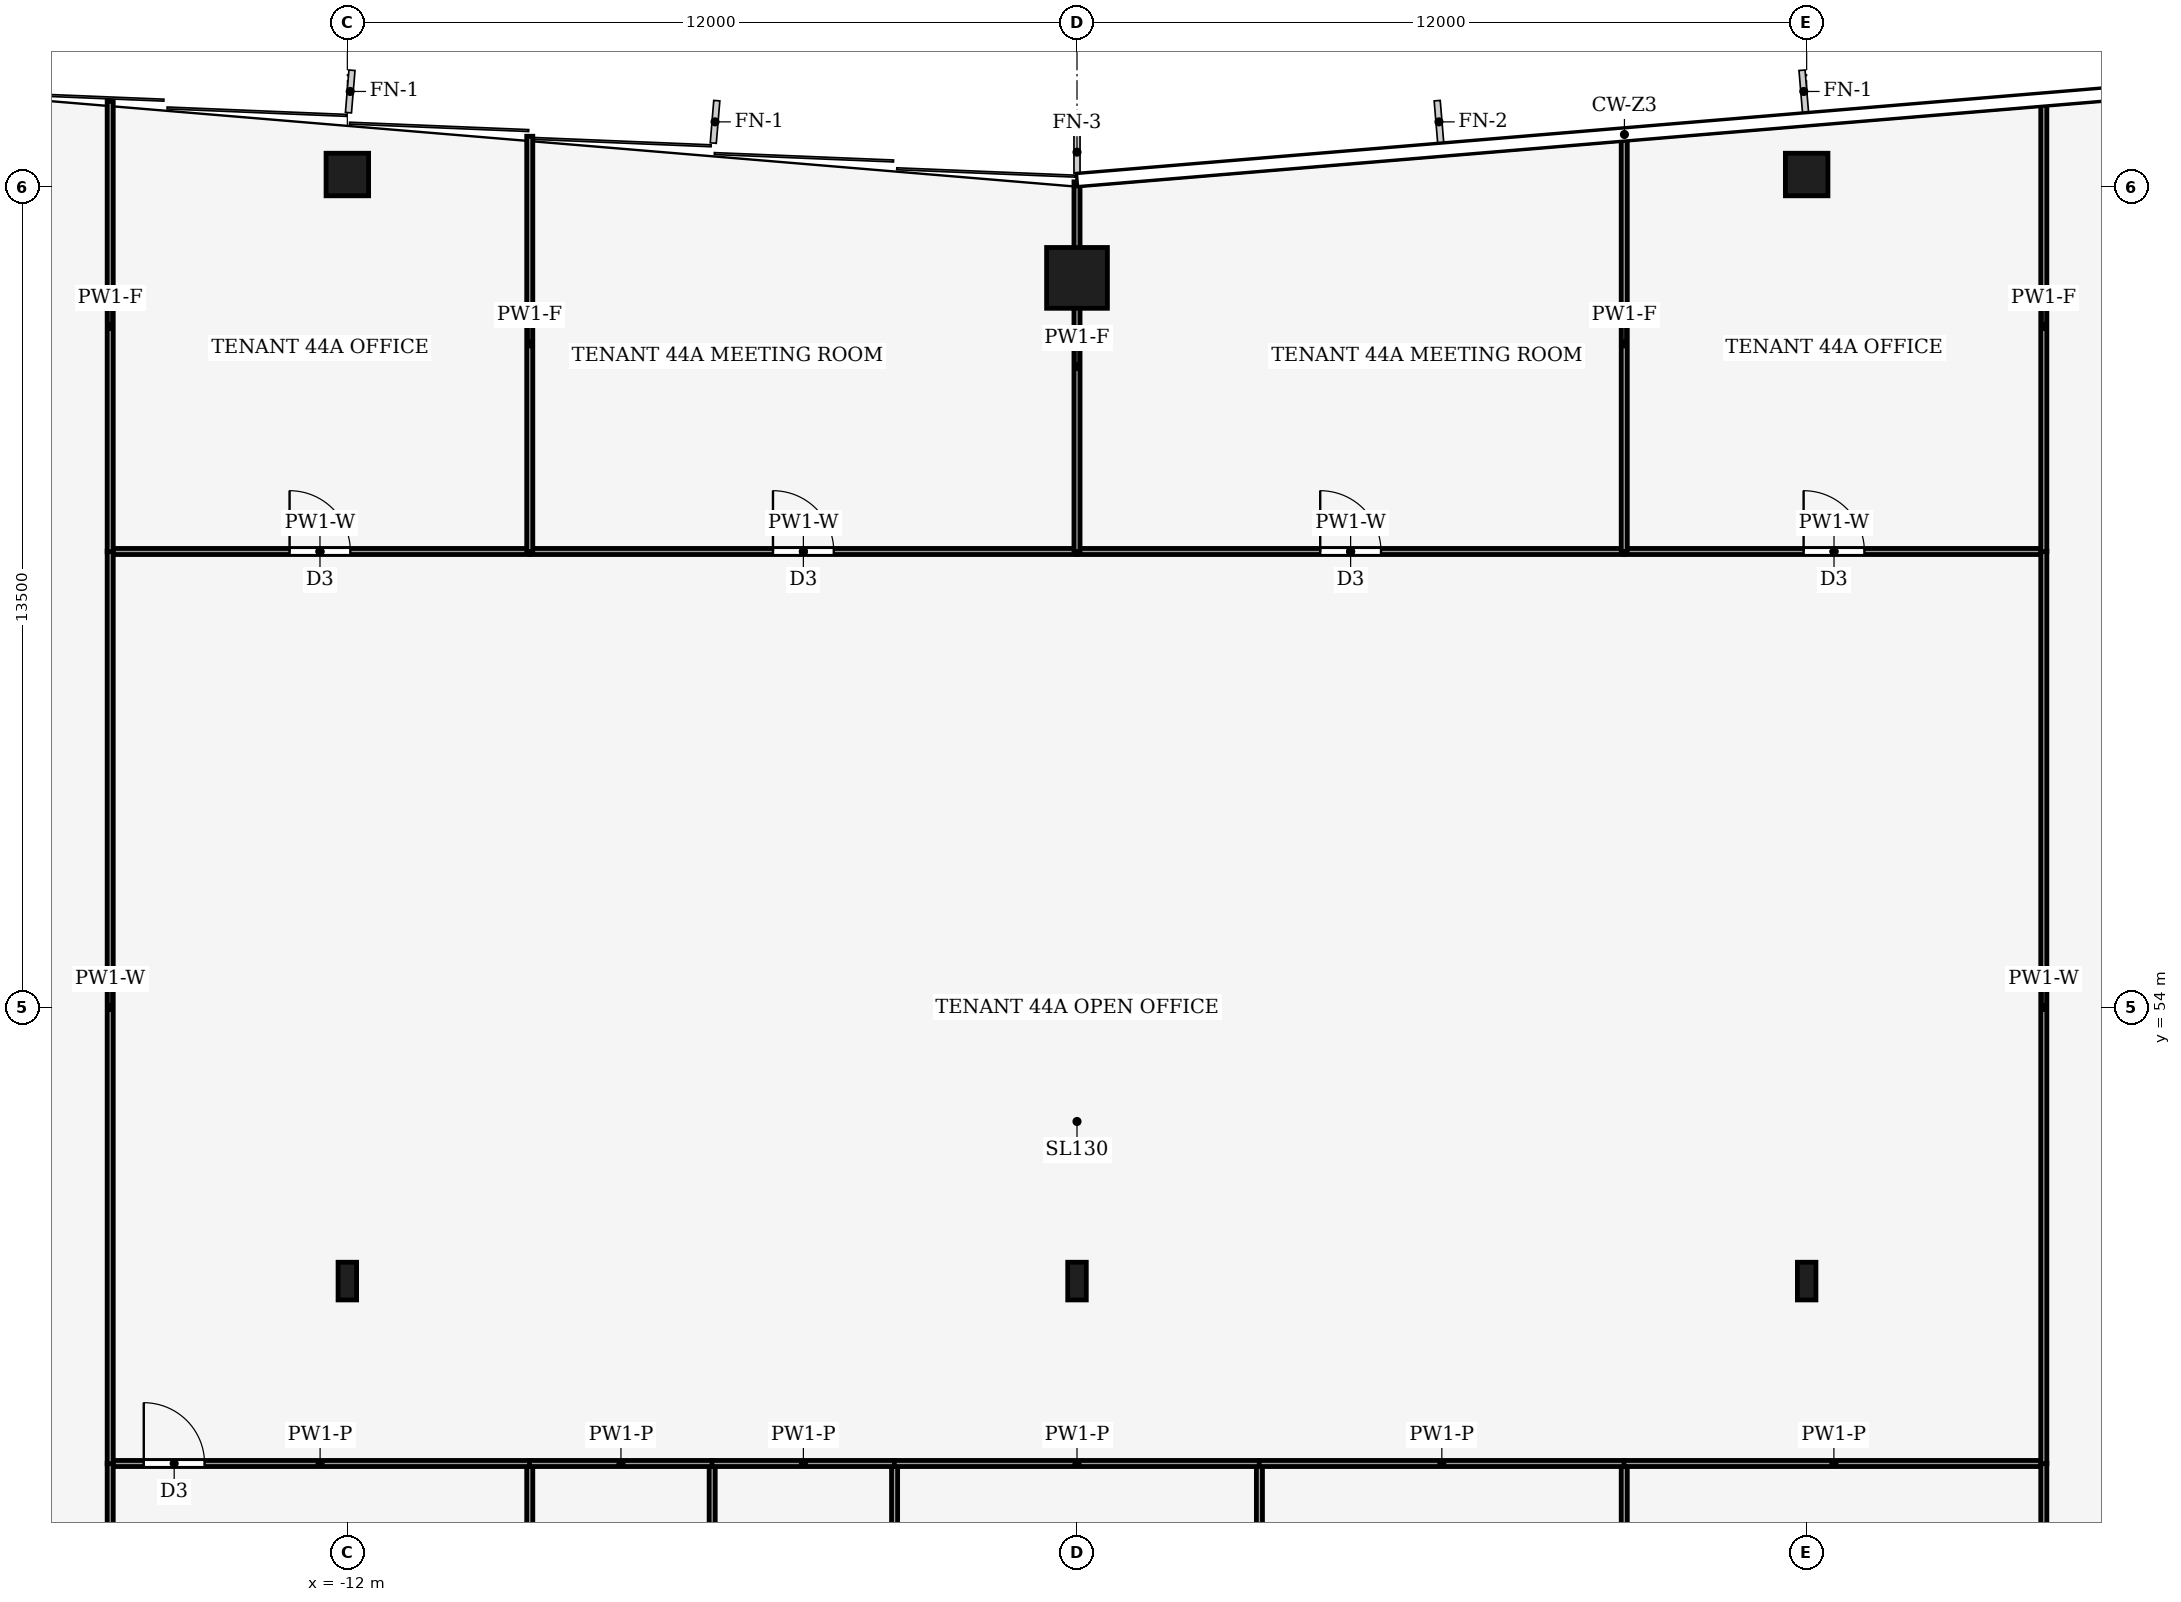
"""IFC4 building model, lengths in metres.
Left out: names, types, materials, properties, quantities, classifications, styles, units other than length and angle.
Written with IfcOpenShell. Run it as: python <this file> out.ifc"""

import sys

from ifc_helpers import new_model, si_unit, direction, frame, frame_2d, origin, origin_2d, place, context, subcontext, project, spatial, rectangle, hollow_rectangle, i_section, extrude, element, fill, save


model = new_model("IFC4")
c1 = context("Model", 3, precision=1e-05, world=origin(), true_north=direction((0.0, 1.0)))
c2 = subcontext(c1, "Body", "Model", "MODEL_VIEW")
j1 = project(units=[si_unit("LENGTHUNIT", "METRE"), si_unit("PLANEANGLEUNIT", "RADIAN")], contexts=[c1])
p1 = place(None, origin())
s1 = spatial("IfcSite", under=j1, at=p1, CompositionType="ELEMENT")
p2 = place(p1, origin())
s2 = spatial("IfcBuilding", under=s1, at=p2, CompositionType="ELEMENT")
p3 = place(p2, frame((0.0, 0.0, 194.0)))
s3 = spatial("IfcBuildingStorey", under=s2, at=p3, CompositionType="ELEMENT", Elevation=194.0)
p4 = place(p3, frame((0.0, 66.0, 0.0), z_axis=(0.0, 0.0, 1.0), x_axis=(1.0, 0.0, 0.0)))
e1 = element("IfcColumn", 1, at=p4, inside=s3, PredefinedType="COLUMN", context=c2, shape_type="SweptSolid", body=[
    extrude(hollow_rectangle(XDim=1.0, YDim=1.0, WallThickness=0.06, at=origin_2d()), origin(), (0.0, 0.0, 1.0), 4.0),
])
for number, where, z_axis, x_axis in (
    (2, (-12.0, 67.7, 0.0), (0.0, 0.0, 1.0), (1.0, 0.0, 0.0)),
    (3, (12.0, 67.7, 0.0), (0.0, 0.0, 1.0), (1.0, 0.0, 0.0)),
):
    element("IfcColumn", number, at=place(p3, frame(where, z_axis=z_axis, x_axis=x_axis)), inside=s3, PredefinedType="COLUMN", context=c2, shape_type="SweptSolid", body=[
        extrude(hollow_rectangle(XDim=0.7, YDim=0.7, WallThickness=0.03, at=origin_2d()), origin(), (0.0, 0.0, 1.0), 4.0),
    ])
for number, where, z_axis, x_axis in (
    (4, (-12.0, 49.5, 0.0), (0.0, 0.0, 1.0), (1.0, 0.0, 0.0)),
    (5, (0.0, 49.5, 0.0), (0.0, 0.0, 1.0), (1.0, 0.0, 0.0)),
    (6, (12.0, 49.5, 0.0), (0.0, 0.0, 1.0), (1.0, 0.0, 0.0)),
):
    element("IfcColumn", number, at=place(p3, frame(where, z_axis=z_axis, x_axis=x_axis)), inside=s3, PredefinedType="COLUMN", context=c2, shape_type="SweptSolid", body=[
        extrude(i_section(OverallWidth=0.305, OverallDepth=0.62, WebThickness=0.021, FlangeThickness=0.04, FilletRadius=0.027, at=origin_2d()), origin(), (0.0, 0.0, 1.0), 4.0),
    ])
p5 = place(p3, frame((-9.0, 46.5, 0.0), z_axis=(0.0, 0.0, 1.0), x_axis=(0.0, -1.0, 0.0)))
e7 = element("IfcWall", 7, at=p5, inside=s3, PredefinedType="PARTITIONING", context=c2, shape_type="SweptSolid", body=[
    extrude(rectangle(XDim=5.6, YDim=0.1, at=frame_2d((2.8, 0.0))), origin(), (0.0, 0.0, 1.0), 3.87),
])
p6 = place(p5, frame((2.3, 0.0, 0.0)))
e8 = element("IfcOpeningElement", 8, at=p6, cuts=e7, PredefinedType="OPENING", context=c2, shape_type="SweptSolid", body=[
    extrude(rectangle(XDim=1.0, YDim=2.1, at=frame_2d((0.5, 1.05))), frame((0.0, 0.06, 0.0), z_axis=(0.0, -1.0, 0.0), x_axis=(1.0, 0.0, 0.0)), (0.0, 0.0, 1.0), 0.12),
])
p7 = place(p3, frame((-15.9, 46.5, 0.0), z_axis=(0.0, 0.0, 1.0), x_axis=(1.0, 0.0, 0.0)))
e9 = element("IfcWall", 9, at=p7, inside=s3, PredefinedType="PARTITIONING", context=c2, shape_type="SweptSolid", body=[
    extrude(rectangle(XDim=6.904, YDim=0.1, at=frame_2d((3.452, 0.0))), origin(), (0.0, 0.0, 1.0), 3.44),
])
p8 = place(p7, frame((0.552, 0.0, 0.0)))
e10 = element("IfcOpeningElement", 10, at=p8, cuts=e9, PredefinedType="OPENING", context=c2, shape_type="SweptSolid", body=[
    extrude(rectangle(XDim=1.0, YDim=2.1, at=frame_2d((0.5, 1.05))), frame((0.0, 0.06, 0.0), z_axis=(0.0, -1.0, 0.0), x_axis=(1.0, 0.0, 0.0)), (0.0, 0.0, 1.0), 0.12),
])
p9 = place(p3, frame((-15.9, 46.504, 0.0), z_axis=(0.0, 0.0, 1.0), x_axis=(0.0, -1.0, 0.0)))
e11 = element("IfcWall", 11, at=p9, inside=s3, PredefinedType="PARTITIONING", context=c2, shape_type="SweptSolid", body=[
    extrude(rectangle(XDim=5.608, YDim=0.1, at=frame_2d((2.804, 0.0))), origin(), (0.0, 0.0, 1.0), 3.44),
])
p10 = place(p3, frame((-6.0, 46.5, 0.0), z_axis=(0.0, 0.0, 1.0), x_axis=(0.0, -1.0, 0.0)))
e12 = element("IfcWall", 12, at=p10, inside=s3, PredefinedType="PARTITIONING", context=c2, shape_type="SweptSolid", body=[
    extrude(rectangle(XDim=5.6, YDim=0.1, at=frame_2d((2.8, 0.0))), origin(), (0.0, 0.0, 1.0), 3.87),
])
p11 = place(p10, frame((2.3, 0.0, 0.0)))
e13 = element("IfcOpeningElement", 13, at=p11, cuts=e12, PredefinedType="OPENING", context=c2, shape_type="SweptSolid", body=[
    extrude(rectangle(XDim=1.0, YDim=2.1, at=frame_2d((0.5, 1.05))), frame((0.0, 0.06, 0.0), z_axis=(0.0, -1.0, 0.0), x_axis=(1.0, 0.0, 0.0)), (0.0, 0.0, 1.0), 0.12),
])
p12 = place(p3, frame((-5.996, 46.5, 0.0), z_axis=(0.0, 0.0, 1.0), x_axis=(-1.0, 0.0, 0.0)))
e14 = element("IfcWall", 14, at=p12, inside=s3, PredefinedType="PARTITIONING", context=c2, shape_type="SweptSolid", body=[
    extrude(rectangle(XDim=3.008, YDim=0.1, at=frame_2d((1.504, 0.0))), origin(), (0.0, 0.0, 1.0), 3.44),
])
p13 = place(p3, frame((-3.0, 40.9, 0.0), z_axis=(0.0, 0.0, 1.0), x_axis=(0.0, 1.0, 0.0)))
e15 = element("IfcWall", 15, at=p13, inside=s3, PredefinedType="PARTITIONING", context=c2, shape_type="SweptSolid", body=[
    extrude(rectangle(XDim=5.6, YDim=0.1, at=frame_2d((2.8, 0.0))), origin(), (0.0, 0.0, 1.0), 3.87),
])
p14 = place(p3, frame((-2.996, 46.5, 0.0), z_axis=(0.0, 0.0, 1.0), x_axis=(-1.0, 0.0, 0.0)))
e16 = element("IfcWall", 16, at=p14, inside=s3, PredefinedType="PARTITIONING", context=c2, shape_type="SweptSolid", body=[
    extrude(rectangle(XDim=3.008, YDim=0.1, at=frame_2d((1.504, 0.0))), origin(), (0.0, 0.0, 1.0), 3.44),
])
p15 = place(p3, frame((3.0, 40.9, 0.0), z_axis=(0.0, 0.0, 1.0), x_axis=(0.0, 1.0, 0.0)))
e17 = element("IfcWall", 17, at=p15, inside=s3, PredefinedType="PARTITIONING", context=c2, shape_type="SweptSolid", body=[
    extrude(rectangle(XDim=5.6, YDim=0.1, at=frame_2d((2.8, 0.0))), origin(), (0.0, 0.0, 1.0), 3.87),
])
p16 = place(p3, frame((3.004, 46.5, 0.0), z_axis=(0.0, 0.0, 1.0), x_axis=(-1.0, 0.0, 0.0)))
e18 = element("IfcWall", 18, at=p16, inside=s3, PredefinedType="PARTITIONING", context=c2, shape_type="SweptSolid", body=[
    extrude(rectangle(XDim=6.008, YDim=0.1, at=frame_2d((3.004, 0.0))), origin(), (0.0, 0.0, 1.0), 3.44),
])
p17 = place(p3, frame((9.0, 40.9, 0.0), z_axis=(0.0, 0.0, 1.0), x_axis=(0.0, 1.0, 0.0)))
e19 = element("IfcWall", 19, at=p17, inside=s3, PredefinedType="PARTITIONING", context=c2, shape_type="SweptSolid", body=[
    extrude(rectangle(XDim=5.6, YDim=0.1, at=frame_2d((2.8, 0.0))), origin(), (0.0, 0.0, 1.0), 3.87),
])
p18 = place(p3, frame((9.004, 46.5, 0.0), z_axis=(0.0, 0.0, 1.0), x_axis=(-1.0, 0.0, 0.0)))
e20 = element("IfcWall", 20, at=p18, inside=s3, PredefinedType="PARTITIONING", context=c2, shape_type="SweptSolid", body=[
    extrude(rectangle(XDim=6.008, YDim=0.1, at=frame_2d((3.004, 0.0))), origin(), (0.0, 0.0, 1.0), 3.44),
])
p19 = place(p3, frame((15.9, 46.5, 0.0), z_axis=(0.0, 0.0, 1.0), x_axis=(-1.0, 0.0, 0.0)))
e21 = element("IfcWall", 21, at=p19, inside=s3, PredefinedType="PARTITIONING", context=c2, shape_type="SweptSolid", body=[
    extrude(rectangle(XDim=6.904, YDim=0.1, at=frame_2d((3.452, 0.0))), origin(), (0.0, 0.0, 1.0), 3.44),
])
p20 = place(p3, frame((15.9, 40.896, 0.0), z_axis=(0.0, 0.0, 1.0), x_axis=(0.0, 1.0, 0.0)))
e22 = element("IfcWall", 22, at=p20, inside=s3, PredefinedType="PARTITIONING", context=c2, shape_type="SweptSolid", body=[
    extrude(rectangle(XDim=5.608, YDim=0.1, at=frame_2d((2.804, 0.0))), origin(), (0.0, 0.0, 1.0), 3.44),
])
p21 = place(p3, frame((-15.9, 61.5, 0.0), z_axis=(0.0, 0.0, 1.0), x_axis=(1.0, 0.0, 0.0)))
e23 = element("IfcWall", 23, at=p21, inside=s3, PredefinedType="PARTITIONING", context=c2, shape_type="SweptSolid", body=[
    extrude(rectangle(XDim=6.9, YDim=0.1, at=frame_2d((3.45, 0.0))), origin(), (0.0, 0.0, 1.0), 3.24),
])
p22 = place(p21, frame((2.95, 0.0, 0.0)))
e24 = element("IfcOpeningElement", 24, at=p22, cuts=e23, PredefinedType="OPENING", context=c2, shape_type="SweptSolid", body=[
    extrude(rectangle(XDim=1.0, YDim=2.1, at=frame_2d((0.5, 1.05))), frame((0.0, 0.06, 0.0), z_axis=(0.0, -1.0, 0.0), x_axis=(1.0, 0.0, 0.0)), (0.0, 0.0, 1.0), 0.12),
])
p23 = place(p3, frame((-9.0, 61.5, 0.0), z_axis=(0.0, 0.0, 1.0), x_axis=(1.0, 0.0, 0.0)))
e25 = element("IfcWall", 25, at=p23, inside=s3, PredefinedType="PARTITIONING", context=c2, shape_type="SweptSolid", body=[
    extrude(rectangle(XDim=9.0, YDim=0.1, at=frame_2d((4.5, 0.0))), origin(), (0.0, 0.0, 1.0), 3.24),
])
p24 = place(p23, frame((4.0, 0.0, 0.0)))
e26 = element("IfcOpeningElement", 26, at=p24, cuts=e25, PredefinedType="OPENING", context=c2, shape_type="SweptSolid", body=[
    extrude(rectangle(XDim=1.0, YDim=2.1, at=frame_2d((0.5, 1.05))), frame((0.0, 0.06, 0.0), z_axis=(0.0, -1.0, 0.0), x_axis=(1.0, 0.0, 0.0)), (0.0, 0.0, 1.0), 0.12),
])
p25 = place(p3, frame((0.0, 61.5, 0.0), z_axis=(0.0, 0.0, 1.0), x_axis=(1.0, 0.0, 0.0)))
e27 = element("IfcWall", 27, at=p25, inside=s3, PredefinedType="PARTITIONING", context=c2, shape_type="SweptSolid", body=[
    extrude(rectangle(XDim=9.0, YDim=0.1, at=frame_2d((4.5, 0.0))), origin(), (0.0, 0.0, 1.0), 3.24),
])
p26 = place(p25, frame((4.0, 0.0, 0.0)))
e28 = element("IfcOpeningElement", 28, at=p26, cuts=e27, PredefinedType="OPENING", context=c2, shape_type="SweptSolid", body=[
    extrude(rectangle(XDim=1.0, YDim=2.1, at=frame_2d((0.5, 1.05))), frame((0.0, 0.06, 0.0), z_axis=(0.0, -1.0, 0.0), x_axis=(1.0, 0.0, 0.0)), (0.0, 0.0, 1.0), 0.12),
])
p27 = place(p3, frame((9.0, 61.5, 0.0), z_axis=(0.0, 0.0, 1.0), x_axis=(1.0, 0.0, 0.0)))
e29 = element("IfcWall", 29, at=p27, inside=s3, PredefinedType="PARTITIONING", context=c2, shape_type="SweptSolid", body=[
    extrude(rectangle(XDim=6.9, YDim=0.1, at=frame_2d((3.45, 0.0))), origin(), (0.0, 0.0, 1.0), 3.24),
])
p28 = place(p27, frame((2.95, 0.0, 0.0)))
e30 = element("IfcOpeningElement", 30, at=p28, cuts=e29, PredefinedType="OPENING", context=c2, shape_type="SweptSolid", body=[
    extrude(rectangle(XDim=1.0, YDim=2.1, at=frame_2d((0.5, 1.05))), frame((0.0, 0.06, 0.0), z_axis=(0.0, -1.0, 0.0), x_axis=(1.0, 0.0, 0.0)), (0.0, 0.0, 1.0), 0.12),
])
for number, where, z_axis, x_axis in (
    (31, (-15.9, 61.504, 0.0), (0.0, 0.0, 1.0), (0.0, -1.0, 0.0)),
    (32, (15.9, 46.496, 0.0), (0.0, 0.0, 1.0), (0.0, 1.0, 0.0)),
):
    element("IfcWall", number, at=place(p3, frame(where, z_axis=z_axis, x_axis=x_axis)), inside=s3, PredefinedType="PARTITIONING", context=c2, shape_type="SweptSolid", body=[
        extrude(rectangle(XDim=15.008, YDim=0.1, at=frame_2d((7.504, 0.0))), origin(), (0.0, 0.0, 1.0), 3.24),
    ])
p29 = place(p3, frame((-9.0, 61.5, 0.0), z_axis=(0.0, 0.0, 1.0), x_axis=(0.0, 1.0, 0.0)))
e33 = element("IfcWall", 33, at=p29, inside=s3, PredefinedType="PARTITIONING", context=c2, shape_type="SweptSolid", body=[
    extrude(rectangle(XDim=6.83, YDim=0.1, at=frame_2d((3.415, 0.0))), origin(), (0.0, 0.0, 1.0), 3.04),
])
p30 = place(p3, frame((-15.9, 68.905, 0.0), z_axis=(0.0, 0.0, 1.0), x_axis=(0.0, -1.0, 0.0)))
e34 = element("IfcWall", 34, at=p30, inside=s3, PredefinedType="PARTITIONING", context=c2, shape_type="SweptSolid", body=[
    extrude(rectangle(XDim=7.409, YDim=0.1, at=frame_2d((3.705, 0.0))), origin(), (0.0, 0.0, 1.0), 3.04),
])
p31 = place(p3, frame((0.0, 61.5, 0.0), z_axis=(0.0, 0.0, 1.0), x_axis=(0.0, 1.0, 0.0)))
e35 = element("IfcWall", 35, at=p31, inside=s3, PredefinedType="PARTITIONING", context=c2, shape_type="SweptSolid", body=[
    extrude(rectangle(XDim=6.08, YDim=0.1, at=frame_2d((3.04, 0.0))), origin(), (0.0, 0.0, 1.0), 3.04),
])
p32 = place(p3, frame((9.0, 61.5, 0.0), z_axis=(0.0, 0.0, 1.0), x_axis=(0.0, 1.0, 0.0)))
e36 = element("IfcWall", 36, at=p32, inside=s3, PredefinedType="PARTITIONING", context=c2, shape_type="SweptSolid", body=[
    extrude(rectangle(XDim=6.83, YDim=0.1, at=frame_2d((3.415, 0.0))), origin(), (0.0, 0.0, 1.0), 3.04),
])
p33 = place(p3, frame((15.9, 61.496, 0.0), z_axis=(0.0, 0.0, 1.0), x_axis=(0.0, 1.0, 0.0)))
e37 = element("IfcWall", 37, at=p33, inside=s3, PredefinedType="PARTITIONING", context=c2, shape_type="SweptSolid", body=[
    extrude(rectangle(XDim=7.409, YDim=0.1, at=frame_2d((3.705, 0.0))), origin(), (0.0, 0.0, 1.0), 3.04),
])
p34 = place(p8, origin())
e38 = element("IfcDoor", 38, at=p34, inside=s3, OperationType="SINGLE_SWING_LEFT", PredefinedType="DOOR", context=c2, shape_type="SweptSolid", body=[
    extrude(rectangle(XDim=1.0, YDim=2.1, at=frame_2d((0.5, 1.05))), frame((0.0, 0.025, 0.0), z_axis=(0.0, -1.0, 0.0), x_axis=(1.0, 0.0, 0.0)), (0.0, 0.0, 1.0), 0.05),
])
fill(e10, e38)
p35 = place(p22, origin())
e39 = element("IfcDoor", 39, at=p35, inside=s3, OperationType="SINGLE_SWING_LEFT", PredefinedType="DOOR", context=c2, shape_type="SweptSolid", body=[
    extrude(rectangle(XDim=1.0, YDim=2.1, at=frame_2d((0.5, 1.05))), frame((0.0, 0.025, 0.0), z_axis=(0.0, -1.0, 0.0), x_axis=(1.0, 0.0, 0.0)), (0.0, 0.0, 1.0), 0.05),
])
fill(e24, e39)
p36 = place(p24, origin())
e40 = element("IfcDoor", 40, at=p36, inside=s3, OperationType="SINGLE_SWING_RIGHT", PredefinedType="DOOR", context=c2, shape_type="SweptSolid", body=[
    extrude(rectangle(XDim=1.0, YDim=2.1, at=frame_2d((0.5, 1.05))), frame((0.0, 0.025, 0.0), z_axis=(0.0, -1.0, 0.0), x_axis=(1.0, 0.0, 0.0)), (0.0, 0.0, 1.0), 0.05),
])
fill(e26, e40)
p37 = place(p26, origin())
e41 = element("IfcDoor", 41, at=p37, inside=s3, OperationType="SINGLE_SWING_LEFT", PredefinedType="DOOR", context=c2, shape_type="SweptSolid", body=[
    extrude(rectangle(XDim=1.0, YDim=2.1, at=frame_2d((0.5, 1.05))), frame((0.0, 0.025, 0.0), z_axis=(0.0, -1.0, 0.0), x_axis=(1.0, 0.0, 0.0)), (0.0, 0.0, 1.0), 0.05),
])
fill(e28, e41)
p38 = place(p28, origin())
e42 = element("IfcDoor", 42, at=p38, inside=s3, OperationType="SINGLE_SWING_RIGHT", PredefinedType="DOOR", context=c2, shape_type="SweptSolid", body=[
    extrude(rectangle(XDim=1.0, YDim=2.1, at=frame_2d((0.5, 1.05))), frame((0.0, 0.025, 0.0), z_axis=(0.0, -1.0, 0.0), x_axis=(1.0, 0.0, 0.0)), (0.0, 0.0, 1.0), 0.05),
])
fill(e30, e42)
save(model, sys.argv[1])
